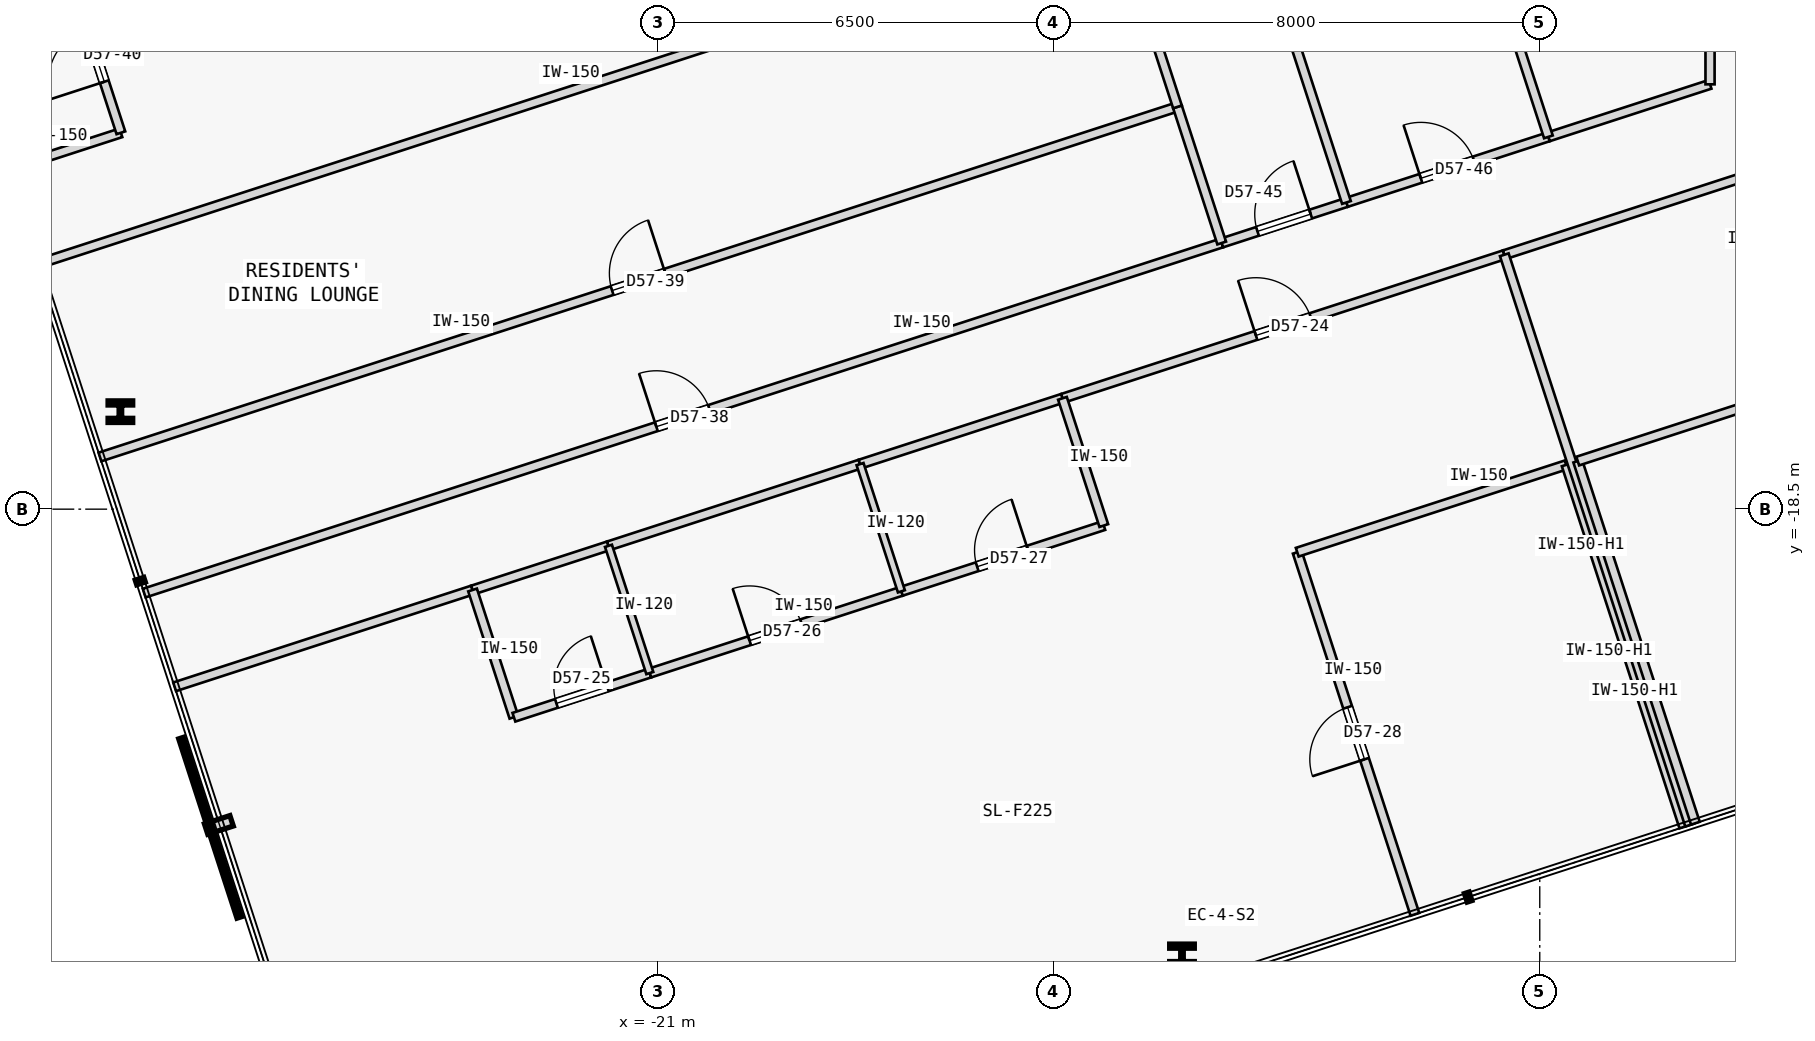
"""IFC4 building model, lengths in metres.
Left out: names, types, materials, properties, quantities, classifications, styles, units other than length and angle.
Written with IfcOpenShell. Run it as: python <this file> out.ifc"""

import sys

from ifc_helpers import new_model, si_unit, direction, frame, frame_2d, origin, origin_2d, place, context, subcontext, project, spatial, rectangle, i_section, extrude, element, fill, save


model = new_model("IFC4")
c1 = context("Model", 3, precision=1e-05, world=origin(), true_north=direction((0.0, 1.0)))
c2 = subcontext(c1, "Body", "Model", "MODEL_VIEW")
j1 = project(units=[si_unit("LENGTHUNIT", "METRE"), si_unit("PLANEANGLEUNIT", "RADIAN")], contexts=[c1])
p1 = place(None, origin())
s1 = spatial("IfcSite", under=j1, at=p1, CompositionType="ELEMENT")
p2 = place(p1, origin())
s2 = spatial("IfcBuilding", under=s1, at=p2, CompositionType="ELEMENT")
p3 = place(p2, frame((0.0, 0.0, 217.6)))
s3 = spatial("IfcBuildingStorey", under=s2, at=p3, CompositionType="ELEMENT", Elevation=217.6)
for number, where, z_axis, x_axis in (
    (1, (-12.384, -25.83, 0.0), (0.0, 0.0, 1.0), (1.0, 0.0, 0.0)),
    (2, (-29.842, -16.897, 0.0), (0.0, 0.0, 1.0), (1.0, 0.0, 0.0)),
):
    element("IfcColumn", number, at=place(p3, frame(where, z_axis=z_axis, x_axis=x_axis)), inside=s3, PredefinedType="COLUMN", context=c2, shape_type="SweptSolid", body=[
        extrude(i_section(OverallWidth=0.405, OverallDepth=0.355, WebThickness=0.042, FlangeThickness=0.068, FilletRadius=0.015, at=origin_2d()), origin(), (0.0, 0.0, 1.0), 3.35),
    ])
p4 = place(p3, frame((-28.95, -21.421, 0.0), z_axis=(0.0, 0.0, 1.0), x_axis=(0.951058442388, 0.309011066408, 0.0)))
e3 = element("IfcWall", 3, at=p4, inside=s3, PredefinedType="PARTITIONING", context=c2, shape_type="SweptSolid", body=[
    extrude(rectangle(XDim=5.152, YDim=0.15, at=frame_2d((2.576, 0.0))), origin(), (0.0, 0.0, 1.0), 3.125),
])
p5 = place(p3, frame((-14.349, -16.677, 0.0), z_axis=(0.0, 0.0, 1.0), x_axis=(0.951058958043, 0.309009479345, 0.0)))
e4 = element("IfcWall", 4, at=p5, inside=s3, PredefinedType="PARTITIONING", context=c2, shape_type="SweptSolid", body=[
    extrude(rectangle(XDim=7.64, YDim=0.15, at=frame_2d((3.82, 0.0))), origin(), (0.0, 0.0, 1.0), 3.125),
])
p6 = place(p5, frame((3.345, 0.0, 0.0)))
e5 = element("IfcOpeningElement", 5, at=p6, cuts=e4, PredefinedType="OPENING", context=c2, shape_type="SweptSolid", body=[
    extrude(rectangle(XDim=0.95, YDim=2.15, at=frame_2d((0.475, 1.075))), frame((0.0, 0.085, 0.0), z_axis=(0.0, -1.0, 0.0), x_axis=(1.0, 0.0, 0.0)), (0.0, 0.0, 1.0), 0.17),
])
p7 = place(p3, frame((-24.05, -19.829, 0.0), z_axis=(0.0, 0.0, 1.0), x_axis=(0.951035595692, 0.309081373955, 0.0)))
e6 = element("IfcWall", 6, at=p7, inside=s3, PredefinedType="PARTITIONING", context=c2, shape_type="SweptSolid", body=[
    extrude(rectangle(XDim=2.35, YDim=0.15, at=frame_2d((1.175, 0.0))), origin(), (0.0, 0.0, 1.0), 3.125),
])
p8 = place(p3, frame((-21.815, -19.103, 0.0), z_axis=(0.0, 0.0, 1.0), x_axis=(0.951057987102, 0.309012467661, 0.0)))
e7 = element("IfcWall", 7, at=p8, inside=s3, PredefinedType="PARTITIONING", context=c2, shape_type="SweptSolid", body=[
    extrude(rectangle(XDim=4.35, YDim=0.15, at=frame_2d((2.175, 0.0))), origin(), (0.0, 0.0, 1.0), 3.125),
])
p9 = place(p3, frame((-17.678, -17.759, 0.0), z_axis=(0.0, 0.0, 1.0), x_axis=(0.951055596592, 0.309019824916, 0.0)))
e8 = element("IfcWall", 8, at=p9, inside=s3, PredefinedType="PARTITIONING", context=c2, shape_type="SweptSolid", body=[
    extrude(rectangle(XDim=3.5, YDim=0.15, at=frame_2d((1.75, 0.0))), origin(), (0.0, 0.0, 1.0), 3.125),
])
p10 = place(p3, frame((-7.083, -14.316, 0.0), z_axis=(0.0, 0.0, 1.0), x_axis=(0.951054265246, 0.309023922305, 0.0)))
e9 = element("IfcWall", 9, at=p10, inside=s3, PredefinedType="PARTITIONING", context=c2, shape_type="SweptSolid", body=[
    extrude(rectangle(XDim=4.53, YDim=0.15, at=frame_2d((2.265, 0.0))), origin(), (0.0, 0.0, 1.0), 3.125),
])
p11 = place(p3, frame((-29.45, -19.881, 0.0), z_axis=(0.0, 0.0, 1.0), x_axis=(0.95105650271, 0.309017036186, 0.0)))
e10 = element("IfcWall", 10, at=p11, inside=s3, PredefinedType="PARTITIONING", context=c2, shape_type="SweptSolid", body=[
    extrude(rectangle(XDim=18.632, YDim=0.15, at=frame_2d((9.316, 0.0))), origin(), (0.0, 0.0, 1.0), 3.125),
])
p12 = place(p11, frame((8.856, 0.0, 0.0)))
e11 = element("IfcOpeningElement", 11, at=p12, cuts=e10, PredefinedType="OPENING", context=c2, shape_type="SweptSolid", body=[
    extrude(rectangle(XDim=0.92, YDim=2.15, at=frame_2d((0.46, 1.075))), frame((0.0, 0.085, 0.0), z_axis=(0.0, -1.0, 0.0), x_axis=(1.0, 0.0, 0.0)), (0.0, 0.0, 1.0), 0.17),
])
p13 = place(p3, frame((-31.712, -12.921, 0.0), z_axis=(0.0, 0.0, 1.0), x_axis=(0.951054051148, 0.309024581215, 0.0)))
e12 = element("IfcWall", 12, at=p13, inside=s3, PredefinedType="PARTITIONING", context=c2, shape_type="SweptSolid", body=[
    extrude(rectangle(XDim=1.975, YDim=0.15, at=frame_2d((0.988, 0.0))), origin(), (0.0, 0.0, 1.0), 3.125),
])
p14 = place(p3, frame((-29.833, -12.311, 0.0), z_axis=(0.0, 0.0, 1.0), x_axis=(-0.309044953986, 0.951047431213, 0.0)))
e13 = element("IfcWall", 13, at=p14, inside=s3, PredefinedType="PARTITIONING", context=c2, shape_type="SweptSolid", body=[
    extrude(rectangle(XDim=2.685, YDim=0.15, at=frame_2d((1.343, 0.0))), origin(), (0.0, 0.0, 1.0), 3.125),
])
p15 = place(p14, frame((0.883, 0.0, 0.0)))
e14 = element("IfcOpeningElement", 14, at=p15, cuts=e13, PredefinedType="OPENING", context=c2, shape_type="SweptSolid", body=[
    extrude(rectangle(XDim=0.92, YDim=2.15, at=frame_2d((0.46, 1.075))), frame((0.0, 0.085, 0.0), z_axis=(0.0, -1.0, 0.0), x_axis=(1.0, 0.0, 0.0)), (0.0, 0.0, 1.0), 0.17),
])
p16 = place(p3, frame((-11.73, -14.123, 0.0), z_axis=(0.0, 0.0, 1.0), x_axis=(0.951066501686, 0.308986260812, 0.0)))
e15 = element("IfcWall", 15, at=p16, inside=s3, PredefinedType="PARTITIONING", context=c2, shape_type="SweptSolid", body=[
    extrude(rectangle(XDim=2.157, YDim=0.15, at=frame_2d((1.079, 0.0))), origin(), (0.0, 0.0, 1.0), 3.125),
])
p17 = place(p16, frame((0.618, 0.0, 0.0)))
e16 = element("IfcOpeningElement", 16, at=p17, cuts=e15, PredefinedType="OPENING", context=c2, shape_type="SweptSolid", body=[
    extrude(rectangle(XDim=0.92, YDim=2.15, at=frame_2d((0.46, 1.075))), frame((0.0, 0.085, 0.0), z_axis=(0.0, -1.0, 0.0), x_axis=(1.0, 0.0, 0.0)), (0.0, 0.0, 1.0), 0.17),
])
p18 = place(p3, frame((-9.679, -13.457, 0.0), z_axis=(0.0, 0.0, 1.0), x_axis=(0.951054104561, 0.309024416831, 0.0)))
e17 = element("IfcWall", 17, at=p18, inside=s3, PredefinedType="PARTITIONING", context=c2, shape_type="SweptSolid", body=[
    extrude(rectangle(XDim=3.492, YDim=0.15, at=frame_2d((1.746, 0.0))), origin(), (0.0, 0.0, 1.0), 3.125),
])
p19 = place(p18, frame((1.286, 0.0, 0.0)))
e18 = element("IfcOpeningElement", 18, at=p19, cuts=e17, PredefinedType="OPENING", context=c2, shape_type="SweptSolid", body=[
    extrude(rectangle(XDim=0.92, YDim=2.15, at=frame_2d((0.46, 1.075))), frame((0.0, 0.085, 0.0), z_axis=(0.0, -1.0, 0.0), x_axis=(1.0, 0.0, 0.0)), (0.0, 0.0, 1.0), 0.17),
])
p20 = place(p3, frame((-6.358, -12.377, 0.0), z_axis=(0.0, 0.0, 1.0), x_axis=(0.951049473261, 0.309038669765, 0.0)))
e19 = element("IfcWall", 19, at=p20, inside=s3, PredefinedType="PARTITIONING", context=c2, shape_type="SweptSolid", body=[
    extrude(rectangle(XDim=2.795, YDim=0.15, at=frame_2d((1.397, 0.0))), origin(), (0.0, 0.0, 1.0), 3.125),
])
p21 = place(p3, frame((-3.7, -11.514, 0.0), z_axis=(0.0, 0.0, 1.0), x_axis=(-8.2572974e-05, 0.999999996591, 0.0)))
e20 = element("IfcWall", 20, at=p21, inside=s3, PredefinedType="PARTITIONING", context=c2, shape_type="SweptSolid", body=[
    extrude(rectangle(XDim=5.913, YDim=0.15, at=frame_2d((2.957, 0.0))), origin(), (0.0, 0.0, 1.0), 3.125),
])
p22 = place(p21, frame((2.497, 0.0, 0.0)))
e21 = element("IfcOpeningElement", 21, at=p22, cuts=e20, PredefinedType="OPENING", context=c2, shape_type="SweptSolid", body=[
    extrude(rectangle(XDim=0.92, YDim=2.15, at=frame_2d((0.46, 1.075))), frame((0.0, 0.085, 0.0), z_axis=(0.0, -1.0, 0.0), x_axis=(1.0, 0.0, 0.0)), (0.0, 0.0, 1.0), 0.17),
])
p23 = place(p3, frame((-23.37, -21.922, 0.0), z_axis=(0.0, 0.0, 1.0), x_axis=(-0.308960600764, 0.951074837842, 0.0)))
e22 = element("IfcWall", 22, at=p23, inside=s3, PredefinedType="PARTITIONING", context=c2, shape_type="SweptSolid", body=[
    extrude(rectangle(XDim=2.2, YDim=0.15, at=frame_2d((1.1, 0.0))), origin(), (0.0, 0.0, 1.0), 3.125),
])
p24 = place(p3, frame((-23.37, -21.922, 0.0), z_axis=(0.0, 0.0, 1.0), x_axis=(0.951045519245, 0.309050837767, 0.0)))
e23 = element("IfcWall", 23, at=p24, inside=s3, PredefinedType="PARTITIONING", context=c2, shape_type="SweptSolid", body=[
    extrude(rectangle(XDim=2.35, YDim=0.15, at=frame_2d((1.175, 0.0))), origin(), (0.0, 0.0, 1.0), 3.125),
])
p25 = place(p24, frame((0.735, 0.0, 0.0)))
e24 = element("IfcOpeningElement", 24, at=p25, cuts=e23, PredefinedType="OPENING", context=c2, shape_type="SweptSolid", body=[
    extrude(rectangle(XDim=0.88, YDim=2.15, at=frame_2d((0.44, 1.075))), frame((0.0, 0.085, 0.0), z_axis=(0.0, -1.0, 0.0), x_axis=(1.0, 0.0, 0.0)), (0.0, 0.0, 1.0), 0.17),
])
p26 = place(p3, frame((-21.135, -21.195, 0.0), z_axis=(0.0, 0.0, 1.0), x_axis=(0.951069122051, 0.308978195154, 0.0)))
e25 = element("IfcWall", 25, at=p26, inside=s3, PredefinedType="PARTITIONING", context=c2, shape_type="SweptSolid", body=[
    extrude(rectangle(XDim=4.35, YDim=0.15, at=frame_2d((2.175, 0.0))), origin(), (0.0, 0.0, 1.0), 3.125),
])
p27 = place(p26, frame((1.725, 0.0, 0.0)))
e26 = element("IfcOpeningElement", 26, at=p27, cuts=e25, PredefinedType="OPENING", context=c2, shape_type="SweptSolid", body=[
    extrude(rectangle(XDim=0.9, YDim=2.15, at=frame_2d((0.45, 1.075))), frame((0.0, 0.085, 0.0), z_axis=(0.0, -1.0, 0.0), x_axis=(1.0, 0.0, 0.0)), (0.0, 0.0, 1.0), 0.17),
])
p28 = place(p3, frame((-16.998, -19.851, 0.0), z_axis=(0.0, 0.0, 1.0), x_axis=(0.951041757107, 0.309062414796, 0.0)))
e27 = element("IfcWall", 27, at=p28, inside=s3, PredefinedType="PARTITIONING", context=c2, shape_type="SweptSolid", body=[
    extrude(rectangle(XDim=3.5, YDim=0.15, at=frame_2d((1.75, 0.0))), origin(), (0.0, 0.0, 1.0), 3.125),
])
p29 = place(p28, frame((1.31, 0.0, 0.0)))
e28 = element("IfcOpeningElement", 28, at=p29, cuts=e27, PredefinedType="OPENING", context=c2, shape_type="SweptSolid", body=[
    extrude(rectangle(XDim=0.88, YDim=2.15, at=frame_2d((0.44, 1.075))), frame((0.0, 0.085, 0.0), z_axis=(0.0, -1.0, 0.0), x_axis=(1.0, 0.0, 0.0)), (0.0, 0.0, 1.0), 0.17),
])
p30 = place(p3, frame((-13.669, -18.77, 0.0), z_axis=(0.0, 0.0, 1.0), x_axis=(-0.309060979314, 0.951042223598, 0.0)))
e29 = element("IfcWall", 29, at=p30, inside=s3, PredefinedType="PARTITIONING", context=c2, shape_type="SweptSolid", body=[
    extrude(rectangle(XDim=2.2, YDim=0.15, at=frame_2d((1.1, 0.0))), origin(), (0.0, 0.0, 1.0), 3.125),
])
p31 = place(p3, frame((-8.553, -25.164, 0.0), z_axis=(0.0, 0.0, 1.0), x_axis=(-0.309013782848, 0.951057559777, 0.0)))
e30 = element("IfcWall", 30, at=p31, inside=s3, PredefinedType="PARTITIONING", context=c2, shape_type="SweptSolid", body=[
    extrude(rectangle(XDim=6.262, YDim=0.15, at=frame_2d((3.131, 0.0))), origin(), (0.0, 0.0, 1.0), 3.125),
])
p32 = place(p31, frame((2.681, 0.0, 0.0)))
e31 = element("IfcOpeningElement", 31, at=p32, cuts=e30, PredefinedType="OPENING", context=c2, shape_type="SweptSolid", body=[
    extrude(rectangle(XDim=0.9, YDim=2.15, at=frame_2d((0.45, 1.075))), frame((0.0, 0.085, 0.0), z_axis=(0.0, -1.0, 0.0), x_axis=(1.0, 0.0, 0.0)), (0.0, 0.0, 1.0), 0.17),
])
p33 = place(p3, frame((-10.488, -19.208, 0.0), z_axis=(0.0, 0.0, 1.0), x_axis=(0.951050272606, 0.309036209813, 0.0)))
e32 = element("IfcWall", 32, at=p33, inside=s3, PredefinedType="PARTITIONING", context=c2, shape_type="SweptSolid", body=[
    extrude(rectangle(XDim=4.65, YDim=0.15, at=frame_2d((2.325, 0.0))), origin(), (0.0, 0.0, 1.0), 3.125),
])
p34 = place(p3, frame((-4.131, -23.727, 0.0), z_axis=(0.0, 0.0, 1.0), x_axis=(-0.309013782848, 0.951057559777, 0.0)))
e33 = element("IfcWall", 33, at=p34, inside=s3, PredefinedType="PARTITIONING", context=c2, shape_type="SweptSolid", body=[
    extrude(rectangle(XDim=6.262, YDim=0.15, at=frame_2d((3.131, 0.0))), origin(), (0.0, 0.0, 1.0), 2.675),
])
p35 = place(p3, frame((-4.036, -23.696, 0.0), z_axis=(0.0, 0.0, 1.0), x_axis=(-0.309022258842, 0.95105480575, 0.0)))
e34 = element("IfcWall", 34, at=p35, inside=s3, PredefinedType="PARTITIONING", context=c2, shape_type="SweptSolid", body=[
    extrude(rectangle(XDim=9.862, YDim=0.15, at=frame_2d((4.931, 0.0))), origin(), (0.0, 0.0, 1.0), 2.675),
])
p36 = place(p3, frame((-21.135, -21.195, 0.0), z_axis=(0.0, 0.0, 1.0), x_axis=(-0.309060979314, 0.951042223598, 0.0)))
e35 = element("IfcWall", 35, at=p36, inside=s3, PredefinedType="PARTITIONING", context=c2, shape_type="SweptSolid", body=[
    extrude(rectangle(XDim=2.2, YDim=0.12, at=frame_2d((1.1, 0.0))), origin(), (0.0, 0.0, 1.0), 3.125),
])
p37 = place(p3, frame((-16.998, -19.851, 0.0), z_axis=(0.0, 0.0, 1.0), x_axis=(-0.30892799396, 0.951085429679, 0.0)))
e36 = element("IfcWall", 36, at=p37, inside=s3, PredefinedType="PARTITIONING", context=c2, shape_type="SweptSolid", body=[
    extrude(rectangle(XDim=2.2, YDim=0.12, at=frame_2d((1.1, 0.0))), origin(), (0.0, 0.0, 1.0), 3.125),
])
p38 = place(p3, frame((-3.941, -23.665, 0.0), z_axis=(0.0, 0.0, 1.0), x_axis=(-0.309013782848, 0.951057559777, 0.0)))
e37 = element("IfcWall", 37, at=p38, inside=s3, PredefinedType="PARTITIONING", context=c2, shape_type="SweptSolid", body=[
    extrude(rectangle(XDim=6.262, YDim=0.15, at=frame_2d((3.131, 0.0))), origin(), (0.0, 0.0, 1.0), 2.675),
])
p39 = place(p3, frame((-5.876, -17.709, 0.0), z_axis=(0.0, 0.0, 1.0), x_axis=(0.951065702951, 0.308988719326, 0.0)))
e38 = element("IfcWall", 38, at=p39, inside=s3, PredefinedType="PARTITIONING", context=c2, shape_type="SweptSolid", body=[
    extrude(rectangle(XDim=4.65, YDim=0.15, at=frame_2d((2.325, 0.0))), origin(), (0.0, 0.0, 1.0), 3.125),
])
p40 = place(p3, frame((-30.178, -17.642, 0.0), z_axis=(0.0, 0.0, 1.0), x_axis=(0.95105650271, 0.309017036186, 0.0)))
e39 = element("IfcWall", 39, at=p40, inside=s3, PredefinedType="PARTITIONING", context=c2, shape_type="SweptSolid", body=[
    extrude(rectangle(XDim=18.632, YDim=0.15, at=frame_2d((9.316, 0.0))), origin(), (0.0, 0.0, 1.0), 3.125),
])
p41 = place(p40, frame((8.856, 0.0, 0.0)))
e40 = element("IfcOpeningElement", 40, at=p41, cuts=e39, PredefinedType="OPENING", context=c2, shape_type="SweptSolid", body=[
    extrude(rectangle(XDim=0.92, YDim=2.15, at=frame_2d((0.46, 1.075))), frame((0.0, 0.085, 0.0), z_axis=(0.0, -1.0, 0.0), x_axis=(1.0, 0.0, 0.0)), (0.0, 0.0, 1.0), 0.17),
])
p42 = place(p3, frame((-11.73, -14.123, 0.0), z_axis=(0.0, 0.0, 1.0), x_axis=(-0.309062621189, 0.951041690035, 0.0)))
e41 = element("IfcWall", 41, at=p42, inside=s3, PredefinedType="PARTITIONING", context=c2, shape_type="SweptSolid", body=[
    extrude(rectangle(XDim=2.354, YDim=0.15, at=frame_2d((1.177, 0.0))), origin(), (0.0, 0.0, 1.0), 3.125),
])
p43 = place(p3, frame((-31.208, -14.471, 0.0), z_axis=(0.0, 0.0, 1.0), x_axis=(0.951057753948, 0.309013185244, 0.0)))
e42 = element("IfcWall", 42, at=p43, inside=s3, PredefinedType="PARTITIONING", context=c2, shape_type="SweptSolid", body=[
    extrude(rectangle(XDim=18.632, YDim=0.15, at=frame_2d((9.316, 0.0))), origin(), (0.0, 0.0, 1.0), 3.125),
])
p44 = place(p3, frame((-12.458, -11.884, 0.0), z_axis=(0.0, 0.0, 1.0), x_axis=(-0.308946982245, 0.951079261766, 0.0)))
e43 = element("IfcWall", 43, at=p44, inside=s3, PredefinedType="PARTITIONING", context=c2, shape_type="SweptSolid", body=[
    extrude(rectangle(XDim=3.334, YDim=0.15, at=frame_2d((1.667, 0.0))), origin(), (0.0, 0.0, 1.0), 3.125),
])
p45 = place(p3, frame((-9.679, -13.457, 0.0), z_axis=(0.0, 0.0, 1.0), x_axis=(-0.309010558951, 0.951058607267, 0.0)))
e44 = element("IfcWall", 44, at=p45, inside=s3, PredefinedType="PARTITIONING", context=c2, shape_type="SweptSolid", body=[
    extrude(rectangle(XDim=8.261, YDim=0.15, at=frame_2d((4.13, 0.0))), origin(), (0.0, 0.0, 1.0), 3.125),
])
p46 = place(p3, frame((-6.358, -12.377, 0.0), z_axis=(0.0, 0.0, 1.0), x_axis=(-0.309024097906, 0.951054208189, 0.0)))
e45 = element("IfcWall", 45, at=p46, inside=s3, PredefinedType="PARTITIONING", context=c2, shape_type="SweptSolid", body=[
    extrude(rectangle(XDim=7.126, YDim=0.15, at=frame_2d((3.563, 0.0))), origin(), (0.0, 0.0, 1.0), 2.675),
])
p47 = place(p6, origin())
e46 = element("IfcDoor", 46, at=p47, inside=s3, OperationType="SINGLE_SWING_LEFT", PredefinedType="DOOR", context=c2, shape_type="SweptSolid", body=[
    extrude(rectangle(XDim=0.95, YDim=2.15, at=frame_2d((0.475, 1.075))), frame((0.0, 0.025, 0.0), z_axis=(0.0, -1.0, 0.0), x_axis=(1.0, 0.0, 0.0)), (0.0, 0.0, 1.0), 0.05),
])
fill(e5, e46)
p48 = place(p25, origin())
e47 = element("IfcDoor", 47, at=p48, inside=s3, OperationType="SINGLE_SWING_RIGHT", PredefinedType="DOOR", context=c2, shape_type="SweptSolid", body=[
    extrude(rectangle(XDim=0.88, YDim=2.15, at=frame_2d((0.44, 1.075))), frame((0.0, 0.025, 0.0), z_axis=(0.0, -1.0, 0.0), x_axis=(1.0, 0.0, 0.0)), (0.0, 0.0, 1.0), 0.05),
])
fill(e24, e47)
p49 = place(p27, origin())
e48 = element("IfcDoor", 48, at=p49, inside=s3, OperationType="SINGLE_SWING_LEFT", PredefinedType="DOOR", context=c2, shape_type="SweptSolid", body=[
    extrude(rectangle(XDim=0.9, YDim=2.15, at=frame_2d((0.45, 1.075))), frame((0.0, 0.025, 0.0), z_axis=(0.0, -1.0, 0.0), x_axis=(1.0, 0.0, 0.0)), (0.0, 0.0, 1.0), 0.05),
])
fill(e26, e48)
p50 = place(p29, origin())
e49 = element("IfcDoor", 49, at=p50, inside=s3, OperationType="SINGLE_SWING_RIGHT", PredefinedType="DOOR", context=c2, shape_type="SweptSolid", body=[
    extrude(rectangle(XDim=0.88, YDim=2.15, at=frame_2d((0.44, 1.075))), frame((0.0, 0.025, 0.0), z_axis=(0.0, -1.0, 0.0), x_axis=(1.0, 0.0, 0.0)), (0.0, 0.0, 1.0), 0.05),
])
fill(e28, e49)
p51 = place(p32, origin())
e50 = element("IfcDoor", 50, at=p51, inside=s3, OperationType="SINGLE_SWING_LEFT", PredefinedType="DOOR", context=c2, shape_type="SweptSolid", body=[
    extrude(rectangle(XDim=0.9, YDim=2.15, at=frame_2d((0.45, 1.075))), frame((0.0, 0.025, 0.0), z_axis=(0.0, -1.0, 0.0), x_axis=(1.0, 0.0, 0.0)), (0.0, 0.0, 1.0), 0.05),
])
fill(e31, e50)
p52 = place(p12, origin())
e51 = element("IfcDoor", 51, at=p52, inside=s3, OperationType="SINGLE_SWING_LEFT", PredefinedType="DOOR", context=c2, shape_type="SweptSolid", body=[
    extrude(rectangle(XDim=0.92, YDim=2.15, at=frame_2d((0.46, 1.075))), frame((0.0, 0.025, 0.0), z_axis=(0.0, -1.0, 0.0), x_axis=(1.0, 0.0, 0.0)), (0.0, 0.0, 1.0), 0.05),
])
fill(e11, e51)
p53 = place(p41, origin())
e52 = element("IfcDoor", 52, at=p53, inside=s3, OperationType="SINGLE_SWING_RIGHT", PredefinedType="DOOR", context=c2, shape_type="SweptSolid", body=[
    extrude(rectangle(XDim=0.92, YDim=2.15, at=frame_2d((0.46, 1.075))), frame((0.0, 0.025, 0.0), z_axis=(0.0, -1.0, 0.0), x_axis=(1.0, 0.0, 0.0)), (0.0, 0.0, 1.0), 0.05),
])
fill(e40, e52)
p54 = place(p15, origin())
e53 = element("IfcDoor", 53, at=p54, inside=s3, OperationType="SINGLE_SWING_LEFT", PredefinedType="DOOR", context=c2, shape_type="SweptSolid", body=[
    extrude(rectangle(XDim=0.92, YDim=2.15, at=frame_2d((0.46, 1.075))), frame((0.0, 0.025, 0.0), z_axis=(0.0, -1.0, 0.0), x_axis=(1.0, 0.0, 0.0)), (0.0, 0.0, 1.0), 0.05),
])
fill(e14, e53)
p55 = place(p17, origin())
e54 = element("IfcDoor", 54, at=p55, inside=s3, OperationType="SINGLE_SWING_RIGHT", PredefinedType="DOOR", context=c2, shape_type="SweptSolid", body=[
    extrude(rectangle(XDim=0.92, YDim=2.15, at=frame_2d((0.46, 1.075))), frame((0.0, 0.025, 0.0), z_axis=(0.0, -1.0, 0.0), x_axis=(1.0, 0.0, 0.0)), (0.0, 0.0, 1.0), 0.05),
])
fill(e16, e54)
p56 = place(p19, origin())
e55 = element("IfcDoor", 55, at=p56, inside=s3, OperationType="SINGLE_SWING_LEFT", PredefinedType="DOOR", context=c2, shape_type="SweptSolid", body=[
    extrude(rectangle(XDim=0.92, YDim=2.15, at=frame_2d((0.46, 1.075))), frame((0.0, 0.025, 0.0), z_axis=(0.0, -1.0, 0.0), x_axis=(1.0, 0.0, 0.0)), (0.0, 0.0, 1.0), 0.05),
])
fill(e18, e55)
save(model, sys.argv[1])
